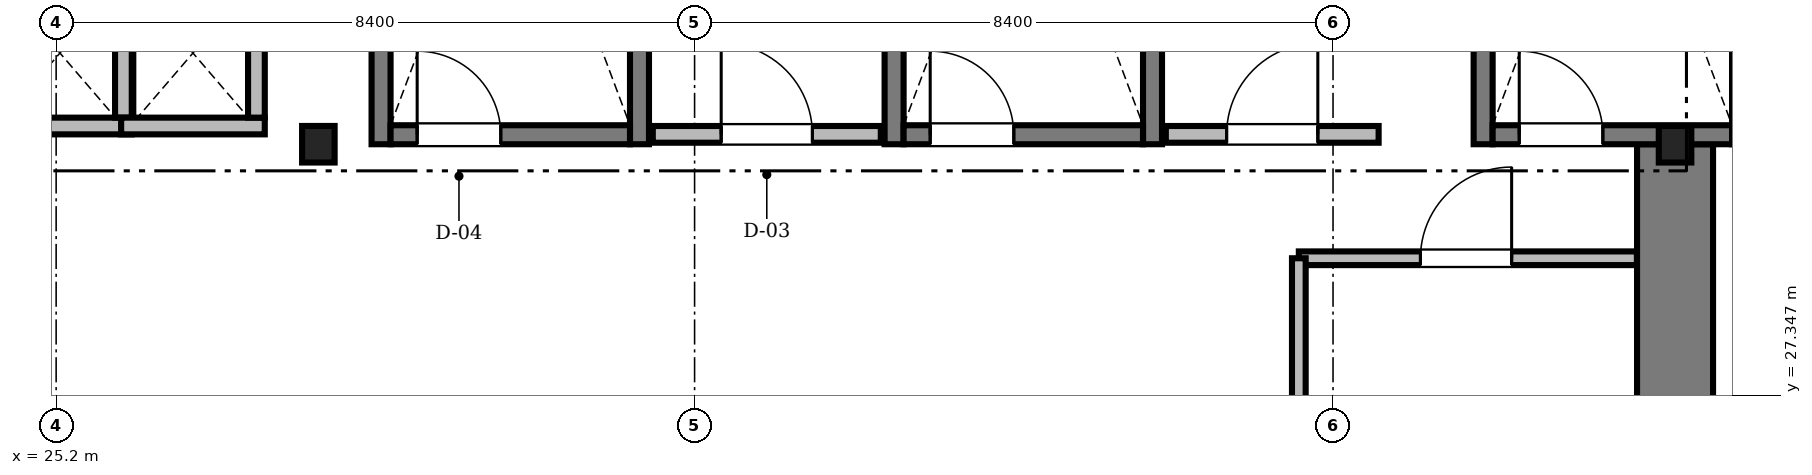
"""IFC4 building model, lengths in metres.
Left out: names, types, materials, properties, quantities, classifications, styles, units other than length and angle.
Written with IfcOpenShell. Run it as: python <this file> out.ifc"""

import sys

from ifc_helpers import new_model, si_unit, direction, frame, frame_2d, origin, origin_2d, place, context, subcontext, project, spatial, rectangle, i_section, extrude, source, transform, mapped, element, fill, save


model = new_model("IFC4")
c1 = context("Model", 3, precision=1e-05, world=origin(), true_north=direction((0.0, 1.0)))
c2 = subcontext(c1, "Body", "Model", "MODEL_VIEW")
j1 = project(units=[si_unit("LENGTHUNIT", "METRE"), si_unit("PLANEANGLEUNIT", "RADIAN")], contexts=[c1])
p1 = place(None, origin())
s1 = spatial("IfcSite", under=j1, at=p1, CompositionType="ELEMENT")
p2 = place(p1, origin())
s2 = spatial("IfcBuilding", under=s1, at=p2, CompositionType="ELEMENT")
p3 = place(p2, frame((0.0, 0.0, 93.3)))
s3 = spatial("IfcBuildingStorey", under=s2, at=p3, CompositionType="ELEMENT", Elevation=93.3)
m1 = source(origin(), c2, "Body", "SweptSolid", [
    extrude(rectangle(XDim=13.15, YDim=1.0, at=frame_2d((6.575, 0.0))), origin(), (0.0, 0.0, 1.0), 4.75),
])
p4 = place(p3, frame((46.5, 17.5, 0.0), z_axis=(0.0, 0.0, 1.0), x_axis=(0.0, 1.0, 0.0)))
e1 = element("IfcWall", 1, at=p4, inside=s3, PredefinedType="SHEAR", context=c2, shape_type="MappedRepresentation", body=[
    mapped(m1, transform((0.0, 0.0, 0.0), scale=1.0)),
])
m2 = source(origin(), c2, "Body", "SweptSolid", [
    extrude(i_section(OverallWidth=0.428, OverallDepth=0.481, WebThickness=0.04, FlangeThickness=0.063, FilletRadius=0.015, at=origin_2d()), origin(), (0.0, 0.0, 1.0), 4.75),
])
for number, where, z_axis, x_axis in (
    (2, (28.65, 30.65, 0.0), (0.0, 0.0, 1.0), (1.0, 0.0, 0.0)),
    (3, (46.5, 30.65, 0.0), (0.0, 0.0, 1.0), (1.0, 0.0, 0.0)),
):
    element("IfcColumn", number, at=place(p3, frame(where, z_axis=z_axis, x_axis=x_axis)), inside=s3, PredefinedType="COLUMN", context=c2, shape_type="MappedRepresentation", body=[
        mapped(m2, transform((0.0, 0.0, 0.0), scale=1.0)),
    ])
m3 = source(origin(), c2, "Body", "SweptSolid", [
    extrude(rectangle(XDim=9.15, YDim=0.25, at=frame_2d((4.575, 0.0))), origin(), (0.0, 0.0, 1.0), 5.2),
])
for number, where, z_axis, x_axis in (
    (4, (29.475, 30.65, 0.0), (0.0, 0.0, 1.0), (0.0, 1.0, 0.0)),
    (5, (32.875, 30.65, 0.0), (0.0, 0.0, 1.0), (0.0, 1.0, 0.0)),
):
    element("IfcWall", number, at=place(p3, frame(where, z_axis=z_axis, x_axis=x_axis)), inside=s3, PredefinedType="SOLIDWALL", context=c2, shape_type="MappedRepresentation", body=[
        mapped(m3, transform((0.0, 0.0, 0.0), scale=1.0)),
    ])
m4 = source(origin(), c2, "Body", "SweptSolid", [
    extrude(rectangle(XDim=3.15, YDim=0.25, at=frame_2d((1.575, 0.0))), origin(), (0.0, 0.0, 1.0), 5.2),
])
p5 = place(p3, frame((29.6, 30.775, 0.0), z_axis=(0.0, 0.0, 1.0), x_axis=(1.0, 0.0, 0.0)))
e6 = element("IfcWall", 6, at=p5, inside=s3, PredefinedType="SOLIDWALL", context=c2, shape_type="MappedRepresentation", body=[
    mapped(m4, transform((0.0, 0.0, 0.0), scale=1.0)),
])
m5 = source(origin(), c2, "Body", "SweptSolid", [
    extrude(rectangle(XDim=1.1, YDim=2.2, at=frame_2d((0.55, 1.1))), frame((0.0, 0.135, 0.0), z_axis=(0.0, -1.0, 0.0), x_axis=(1.0, 0.0, 0.0)), (0.0, 0.0, 1.0), 0.27),
])
p6 = place(p5, frame((0.35, 0.0, 0.0)))
e7 = element("IfcOpeningElement", 7, at=p6, cuts=e6, PredefinedType="OPENING", context=c2, shape_type="MappedRepresentation", body=[
    mapped(m5, transform((0.0, 0.0, 0.0), scale=1.0)),
])
for number, where, z_axis, x_axis in (
    (8, (36.225, 30.65, 0.0), (0.0, 0.0, 1.0), (0.0, 1.0, 0.0)),
    (9, (39.625, 30.65, 0.0), (0.0, 0.0, 1.0), (0.0, 1.0, 0.0)),
):
    element("IfcWall", number, at=place(p3, frame(where, z_axis=z_axis, x_axis=x_axis)), inside=s3, PredefinedType="SOLIDWALL", context=c2, shape_type="MappedRepresentation", body=[
        mapped(m3, transform((0.0, 0.0, 0.0), scale=1.0)),
    ])
p7 = place(p3, frame((36.35, 30.775, 0.0), z_axis=(0.0, 0.0, 1.0), x_axis=(1.0, 0.0, 0.0)))
e10 = element("IfcWall", 10, at=p7, inside=s3, PredefinedType="SOLIDWALL", context=c2, shape_type="MappedRepresentation", body=[
    mapped(m4, transform((0.0, 0.0, 0.0), scale=1.0)),
])
p8 = place(p7, frame((0.35, 0.0, 0.0)))
e11 = element("IfcOpeningElement", 11, at=p8, cuts=e10, PredefinedType="OPENING", context=c2, shape_type="MappedRepresentation", body=[
    mapped(m5, transform((0.0, 0.0, 0.0), scale=1.0)),
])
p9 = place(p3, frame((43.975, 30.65, 0.0), z_axis=(0.0, 0.0, 1.0), x_axis=(0.0, 1.0, 0.0)))
e12 = element("IfcWall", 12, at=p9, inside=s3, PredefinedType="SOLIDWALL", context=c2, shape_type="MappedRepresentation", body=[
    mapped(m3, transform((0.0, 0.0, 0.0), scale=1.0)),
])
p10 = place(p3, frame((44.1, 30.775, 0.0), z_axis=(0.0, 0.0, 1.0), x_axis=(1.0, 0.0, 0.0)))
e13 = element("IfcWall", 13, at=p10, inside=s3, PredefinedType="SOLIDWALL", context=c2, shape_type="MappedRepresentation", body=[
    mapped(m4, transform((0.0, 0.0, 0.0), scale=1.0)),
])
p11 = place(p10, frame((0.35, 0.0, 0.0)))
e14 = element("IfcOpeningElement", 14, at=p11, cuts=e13, PredefinedType="OPENING", context=c2, shape_type="MappedRepresentation", body=[
    mapped(m5, transform((0.0, 0.0, 0.0), scale=1.0)),
])
m6 = source(origin(), c2, "Body", "SweptSolid", [
    extrude(rectangle(XDim=3.0, YDim=0.22, at=frame_2d((1.5, 0.0))), origin(), (0.0, 0.0, 1.0), 4.75),
])
p12 = place(p3, frame((33.05, 30.78, 0.0), z_axis=(0.0, 0.0, 1.0), x_axis=(1.0, 0.0, 0.0)))
e15 = element("IfcWall", 15, at=p12, inside=s3, PredefinedType="SOLIDWALL", context=c2, shape_type="MappedRepresentation", body=[
    mapped(m6, transform((0.0, 0.0, 0.0), scale=1.0)),
])
m7 = source(origin(), c2, "Body", "SweptSolid", [
    extrude(rectangle(XDim=1.2, YDim=2.2, at=frame_2d((0.6, 1.1))), frame((0.0, 0.12, 0.0), z_axis=(0.0, -1.0, 0.0), x_axis=(1.0, 0.0, 0.0)), (0.0, 0.0, 1.0), 0.24),
])
p13 = place(p12, frame((0.9, 0.0, 0.0)))
e16 = element("IfcOpeningElement", 16, at=p13, cuts=e15, PredefinedType="OPENING", context=c2, shape_type="MappedRepresentation", body=[
    mapped(m7, transform((0.0, 0.0, 0.0), scale=1.0)),
])
m8 = source(origin(), c2, "Body", "SweptSolid", [
    extrude(rectangle(XDim=2.8, YDim=0.22, at=frame_2d((1.4, 0.0))), origin(), (0.0, 0.0, 1.0), 4.75),
])
p14 = place(p3, frame((39.8, 30.78, 0.0), z_axis=(0.0, 0.0, 1.0), x_axis=(1.0, 0.0, 0.0)))
e17 = element("IfcWall", 17, at=p14, inside=s3, PredefinedType="SOLIDWALL", context=c2, shape_type="MappedRepresentation", body=[
    mapped(m8, transform((0.0, 0.0, 0.0), scale=1.0)),
])
p15 = place(p14, frame((0.8, 0.0, 0.0)))
e18 = element("IfcOpeningElement", 18, at=p15, cuts=e17, PredefinedType="OPENING", context=c2, shape_type="MappedRepresentation", body=[
    mapped(m7, transform((0.0, 0.0, 0.0), scale=1.0)),
])
m9 = source(origin(), c2, "Body", "SweptSolid", [
    extrude(rectangle(XDim=1.89, YDim=0.22, at=frame_2d((0.945, 0.0))), origin(), (0.0, 0.0, 1.0), 4.75),
])
p16 = place(p3, frame((24.305, 30.89, 0.0), z_axis=(0.0, 0.0, 1.0), x_axis=(1.0, 0.0, 0.0)))
e19 = element("IfcWall", 19, at=p16, inside=s3, PredefinedType="SOLIDWALL", context=c2, shape_type="MappedRepresentation", body=[
    mapped(m9, transform((0.0, 0.0, 0.0), scale=1.0)),
])
m10 = source(origin(), c2, "Body", "SweptSolid", [
    extrude(rectangle(XDim=1.7, YDim=0.22, at=frame_2d((0.85, 0.0))), origin(), (0.0, 0.0, 1.0), 4.75),
])
p17 = place(p3, frame((26.085, 31.0, 0.0), z_axis=(0.0, 0.0, 1.0), x_axis=(0.0, 1.0, 0.0)))
e20 = element("IfcWall", 20, at=p17, inside=s3, PredefinedType="SOLIDWALL", context=c2, shape_type="MappedRepresentation", body=[
    mapped(m10, transform((0.0, 0.0, 0.0), scale=1.0)),
])
p18 = place(p3, frame((26.055, 30.89, 0.0), z_axis=(0.0, 0.0, 1.0), x_axis=(1.0, 0.0, 0.0)))
e21 = element("IfcWall", 21, at=p18, inside=s3, PredefinedType="SOLIDWALL", context=c2, shape_type="MappedRepresentation", body=[
    mapped(m9, transform((0.0, 0.0, 0.0), scale=1.0)),
])
p19 = place(p3, frame((27.835, 31.0, 0.0), z_axis=(0.0, 0.0, 1.0), x_axis=(0.0, 1.0, 0.0)))
e22 = element("IfcWall", 22, at=p19, inside=s3, PredefinedType="SOLIDWALL", context=c2, shape_type="MappedRepresentation", body=[
    mapped(m10, transform((0.0, 0.0, 0.0), scale=1.0)),
])
m11 = source(origin(), c2, "Body", "SweptSolid", [
    extrude(rectangle(XDim=4.448, YDim=0.18, at=frame_2d((2.224, 0.0))), origin(), (0.0, 0.0, 1.0), 4.382),
])
p20 = place(p3, frame((41.55, 29.15, 0.0), z_axis=(0.0, 0.0, 1.0), x_axis=(1.0, 0.0, 0.0)))
e23 = element("IfcWall", 23, at=p20, inside=s3, PredefinedType="PARTITIONING", context=c2, shape_type="MappedRepresentation", body=[
    mapped(m11, transform((0.0, 0.0, 0.0), scale=1.0)),
])
m12 = source(origin(), c2, "Body", "SweptSolid", [
    extrude(rectangle(XDim=1.2, YDim=2.2, at=frame_2d((0.6, 1.1))), frame((0.0, 0.1, 0.0), z_axis=(0.0, -1.0, 0.0), x_axis=(1.0, 0.0, 0.0)), (0.0, 0.0, 1.0), 0.2),
])
p21 = place(p20, frame((1.6, 0.0, 0.0)))
e24 = element("IfcOpeningElement", 24, at=p21, cuts=e23, PredefinedType="OPENING", context=c2, shape_type="MappedRepresentation", body=[
    mapped(m12, transform((0.0, 0.0, 0.0), scale=1.0)),
])
m13 = source(origin(), c2, "Body", "SweptSolid", [
    extrude(rectangle(XDim=2.35, YDim=0.18, at=frame_2d((1.175, 0.0))), origin(), (0.0, 0.0, 1.0), 4.382),
])
p22 = place(p3, frame((41.55, 26.8, 0.0), z_axis=(0.0, 0.0, 1.0), x_axis=(0.0, 1.0, 0.0)))
e25 = element("IfcWall", 25, at=p22, inside=s3, PredefinedType="PARTITIONING", context=c2, shape_type="MappedRepresentation", body=[
    mapped(m13, transform((0.0, 0.0, 0.0), scale=1.0)),
])
m14 = source(origin(), c2, "Body", "SweptSolid", [
    extrude(rectangle(XDim=1.1, YDim=2.2, at=frame_2d((0.55, 1.1))), frame((0.0, 0.025, 0.0), z_axis=(0.0, -1.0, 0.0), x_axis=(1.0, 0.0, 0.0)), (0.0, 0.0, 1.0), 0.05),
])
p23 = place(p6, origin())
e26 = element("IfcDoor", 26, at=p23, inside=s3, OperationType="SINGLE_SWING_LEFT", PredefinedType="DOOR", context=c2, shape_type="MappedRepresentation", body=[
    mapped(m14, transform((0.0, 0.0, 0.0), scale=1.0)),
])
fill(e7, e26)
p24 = place(p8, origin())
e27 = element("IfcDoor", 27, at=p24, inside=s3, OperationType="SINGLE_SWING_LEFT", PredefinedType="DOOR", context=c2, shape_type="MappedRepresentation", body=[
    mapped(m14, transform((0.0, 0.0, 0.0), scale=1.0)),
])
fill(e11, e27)
p25 = place(p11, origin())
e28 = element("IfcDoor", 28, at=p25, inside=s3, OperationType="SINGLE_SWING_LEFT", PredefinedType="DOOR", context=c2, shape_type="MappedRepresentation", body=[
    mapped(m14, transform((0.0, 0.0, 0.0), scale=1.0)),
])
fill(e14, e28)
m15 = source(origin(), c2, "Body", "SweptSolid", [
    extrude(rectangle(XDim=1.2, YDim=2.2, at=frame_2d((0.6, 1.1))), frame((0.0, 0.025, 0.0), z_axis=(0.0, -1.0, 0.0), x_axis=(1.0, 0.0, 0.0)), (0.0, 0.0, 1.0), 0.05),
])
p26 = place(p13, origin())
e29 = element("IfcDoor", 29, at=p26, inside=s3, OperationType="SINGLE_SWING_LEFT", PredefinedType="DOOR", context=c2, shape_type="MappedRepresentation", body=[
    mapped(m15, transform((0.0, 0.0, 0.0), scale=1.0)),
])
fill(e16, e29)
p27 = place(p15, origin())
e30 = element("IfcDoor", 30, at=p27, inside=s3, OperationType="SINGLE_SWING_RIGHT", PredefinedType="DOOR", context=c2, shape_type="MappedRepresentation", body=[
    mapped(m15, transform((0.0, 0.0, 0.0), scale=1.0)),
])
fill(e18, e30)
p28 = place(p21, origin())
e31 = element("IfcDoor", 31, at=p28, inside=s3, OperationType="SINGLE_SWING_RIGHT", PredefinedType="DOOR", context=c2, shape_type="MappedRepresentation", body=[
    mapped(m15, transform((0.0, 0.0, 0.0), scale=1.0)),
])
fill(e24, e31)
save(model, sys.argv[1])
